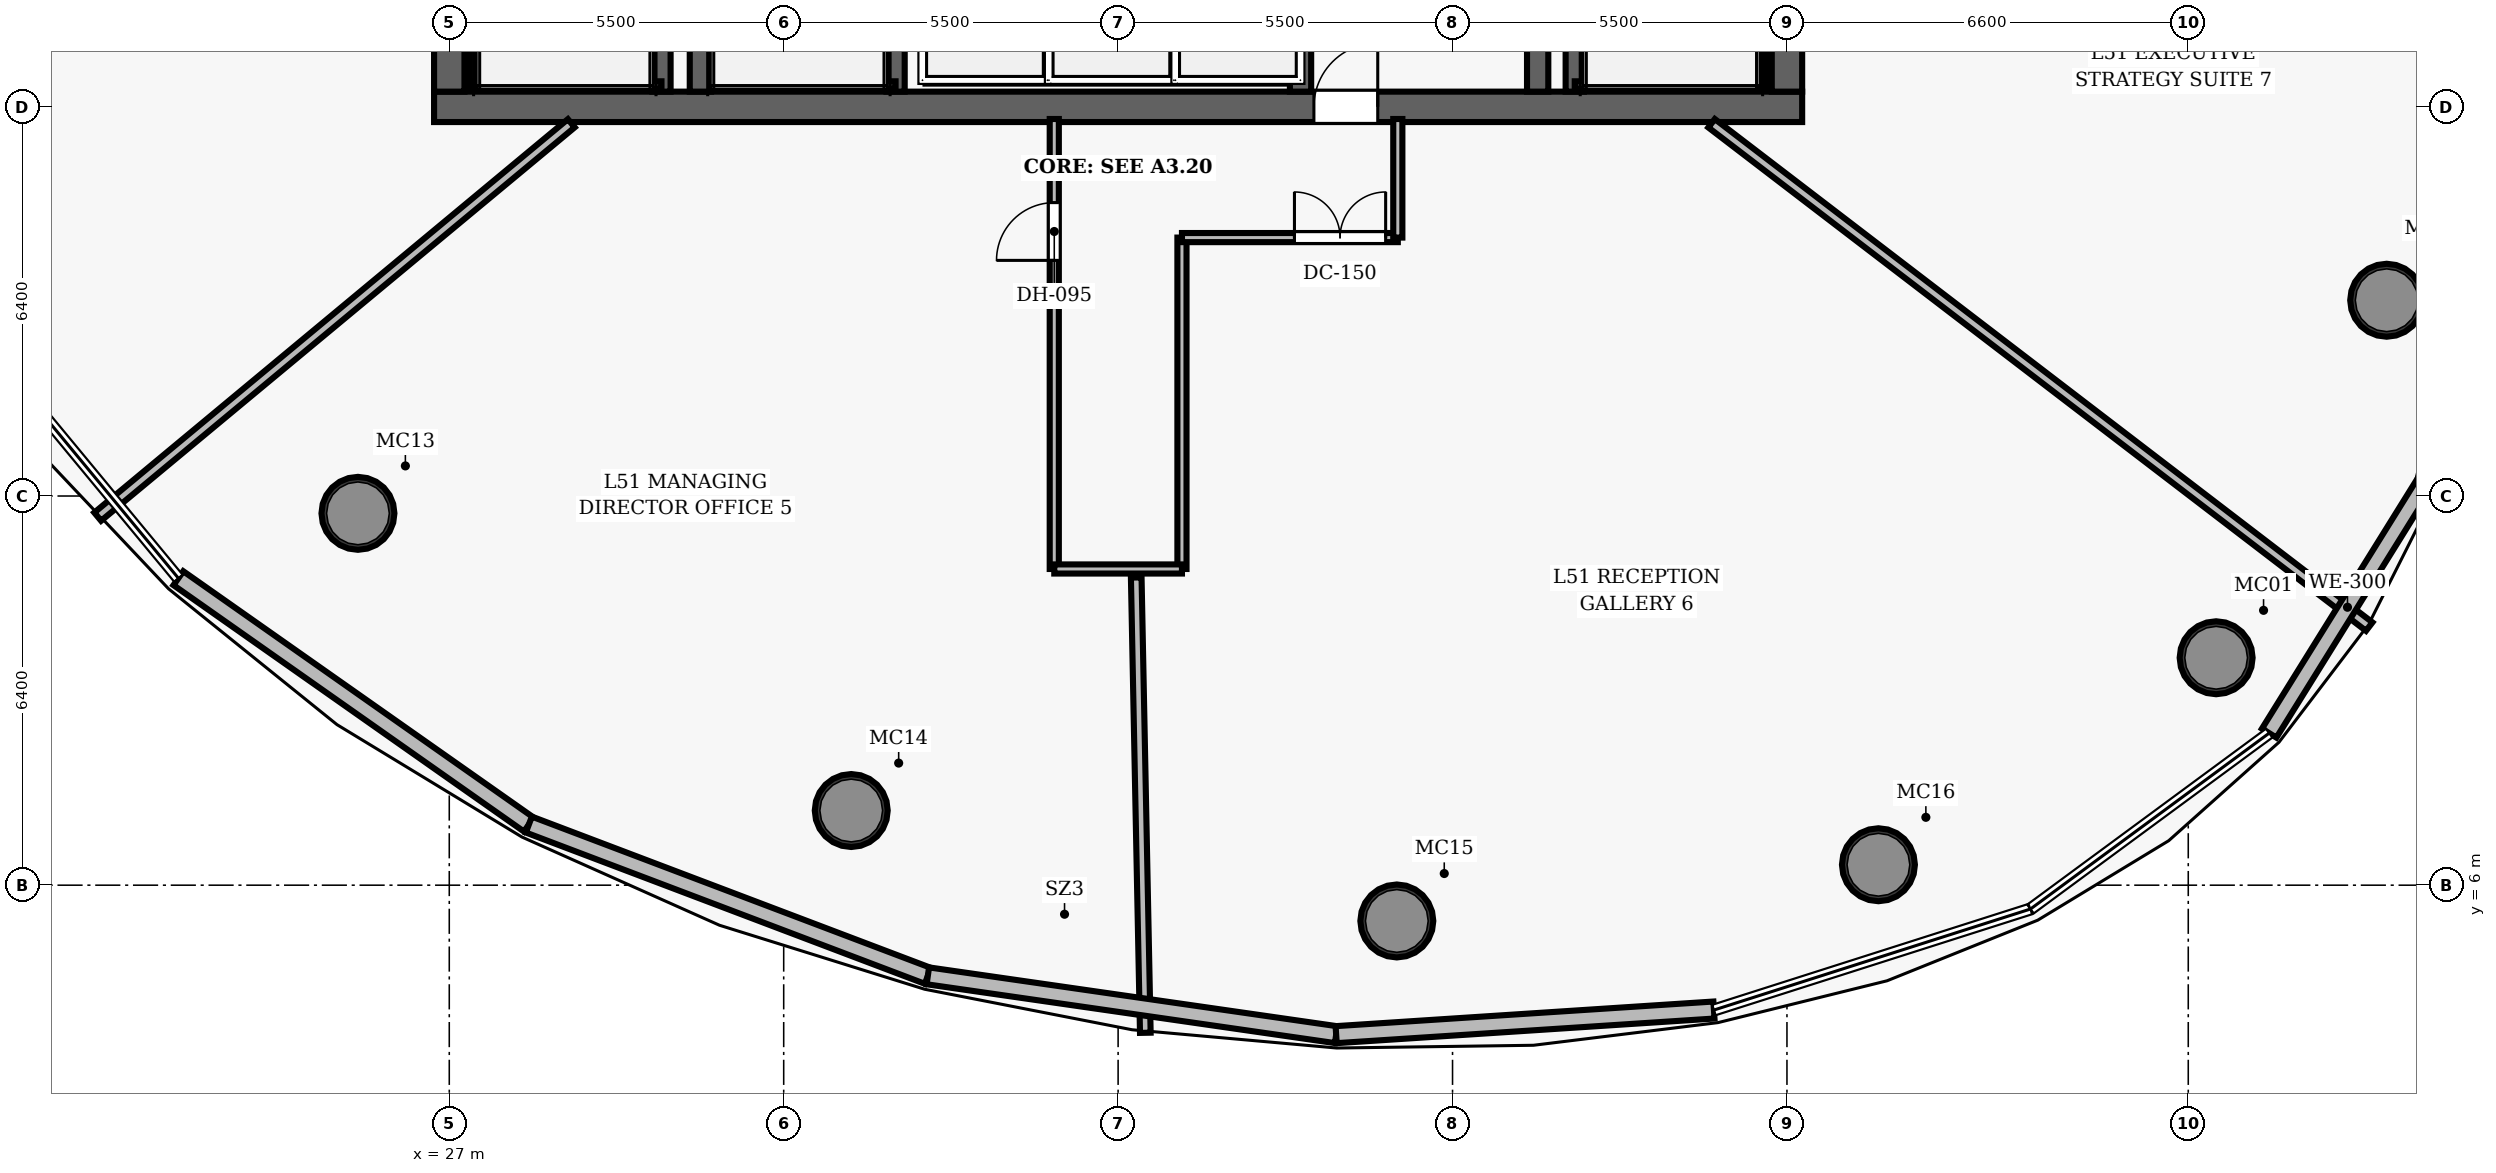
"""IFC4 building model, lengths in metres.
Left out: names, types, materials, properties, quantities, classifications, styles, units other than length and angle.
Written with IfcOpenShell. Run it as: python <this file> out.ifc"""

import sys

from ifc_helpers import new_model, si_unit, direction, frame, frame_2d, origin, origin_2d, place, context, subcontext, project, spatial, rectangle, hollow_circle, extrude, element, fill, save


model = new_model("IFC4")
c1 = context("Model", 3, precision=1e-05, world=origin(), true_north=direction((0.0, 1.0)))
c2 = subcontext(c1, "Body", "Model", "MODEL_VIEW")
j1 = project(units=[si_unit("LENGTHUNIT", "METRE"), si_unit("PLANEANGLEUNIT", "RADIAN")], contexts=[c1])
p1 = place(None, origin())
s1 = spatial("IfcSite", under=j1, at=p1, CompositionType="ELEMENT")
p2 = place(p1, origin())
s2 = spatial("IfcBuilding", under=s1, at=p2, CompositionType="ELEMENT")
p3 = place(p2, frame((0.0, 0.0, 202.0)))
s3 = spatial("IfcBuildingStorey", under=s2, at=p3, CompositionType="ELEMENT", Elevation=202.0)
p4 = place(p3, frame((26.75, 18.8, 0.0), z_axis=(0.0, 0.0, 1.0), x_axis=(1.0, 0.0, 0.0)))
e1 = element("IfcWall", 1, at=p4, inside=s3, PredefinedType="SHEAR", context=c2, shape_type="SweptSolid", body=[
    extrude(rectangle(XDim=22.5, YDim=0.5, at=frame_2d((11.25, 0.0))), origin(), (0.0, 0.0, 1.0), 3.85),
])
p5 = place(p4, frame((14.47, 0.0, 0.0)))
e2 = element("IfcOpeningElement", 2, at=p5, cuts=e1, PredefinedType="OPENING", context=c2, shape_type="SweptSolid", body=[
    extrude(rectangle(XDim=1.05, YDim=2.15, at=frame_2d((0.525, 1.075))), frame((0.0, 0.26, 0.0), z_axis=(0.0, -1.0, 0.0), x_axis=(1.0, 0.0, 0.0)), (0.0, 0.0, 1.0), 0.52),
])
p6 = place(p3, frame((27.0, 19.05, 0.0), z_axis=(0.0, 0.0, 1.0), x_axis=(0.0, 1.0, 0.0)))
e3 = element("IfcWall", 3, at=p6, inside=s3, PredefinedType="SHEAR", context=c2, shape_type="SweptSolid", body=[
    extrude(rectangle(XDim=13.9, YDim=0.5, at=frame_2d((6.95, 0.0))), origin(), (0.0, 0.0, 1.0), 3.85),
])
p7 = place(p6, frame((8.2, 0.0, 0.0)))
e4 = element("IfcOpeningElement", 4, at=p7, cuts=e3, PredefinedType="OPENING", context=c2, shape_type="SweptSolid", body=[
    extrude(rectangle(XDim=1.05, YDim=2.15, at=frame_2d((0.525, 1.075))), frame((0.0, 0.26, 0.0), z_axis=(0.0, -1.0, 0.0), x_axis=(1.0, 0.0, 0.0)), (0.0, 0.0, 1.0), 0.52),
])
p8 = place(p3, frame((49.0, 19.05, 0.0), z_axis=(0.0, 0.0, 1.0), x_axis=(0.0, 1.0, 0.0)))
e5 = element("IfcWall", 5, at=p8, inside=s3, PredefinedType="SHEAR", context=c2, shape_type="SweptSolid", body=[
    extrude(rectangle(XDim=13.9, YDim=0.5, at=frame_2d((6.95, 0.0))), origin(), (0.0, 0.0, 1.0), 3.85),
])
p9 = place(p8, frame((8.2, 0.0, 0.0)))
e6 = element("IfcOpeningElement", 6, at=p9, cuts=e5, PredefinedType="OPENING", context=c2, shape_type="SweptSolid", body=[
    extrude(rectangle(XDim=1.05, YDim=2.15, at=frame_2d((0.525, 1.075))), frame((0.0, 0.26, 0.0), z_axis=(0.0, -1.0, 0.0), x_axis=(1.0, 0.0, 0.0)), (0.0, 0.0, 1.0), 0.52),
])
for number, where, z_axis, x_axis in (
    (7, (31.13, 19.05, 0.0), (0.0, 0.0, 1.0), (0.0, 1.0, 0.0)),
    (8, (44.9, 19.05, 0.0), (0.0, 0.0, 1.0), (0.0, 1.0, 0.0)),
):
    element("IfcWall", number, at=place(p3, frame(where, z_axis=z_axis, x_axis=x_axis)), inside=s3, PredefinedType="SHEAR", context=c2, shape_type="SweptSolid", body=[
        extrude(rectangle(XDim=13.9, YDim=0.35, at=frame_2d((6.95, 0.0))), origin(), (0.0, 0.0, 1.0), 3.85),
    ])
for number, where, z_axis, x_axis in (
    (9, (56.058, 9.74, 0.0), (0.0, 0.0, 1.0), (1.0, 0.0, 0.0)),
    (10, (58.863, 15.619, 0.0), (0.0, 0.0, 1.0), (1.0, 0.0, 0.0)),
    (11, (25.498, 12.115, 0.0), (0.0, 0.0, 1.0), (1.0, 0.0, 0.0)),
    (12, (33.611, 7.228, 0.0), (0.0, 0.0, 1.0), (1.0, 0.0, 0.0)),
    (13, (42.584, 5.412, 0.0), (0.0, 0.0, 1.0), (1.0, 0.0, 0.0)),
    (14, (50.504, 6.336, 0.0), (0.0, 0.0, 1.0), (1.0, 0.0, 0.0)),
):
    element("IfcColumn", number, at=place(p3, frame(where, z_axis=z_axis, x_axis=x_axis)), inside=s3, PredefinedType="COLUMN", context=c2, shape_type="SweptSolid", body=[
        extrude(hollow_circle(Radius=0.6, WallThickness=0.05, at=origin_2d()), origin(), (0.0, 0.0, 1.0), 3.85),
    ])
p10 = place(p3, frame((30.49, 19.05, 0.0), z_axis=(0.0, 0.0, 1.0), x_axis=(0.0, 1.0, 0.0)))
e15 = element("IfcWall", 15, at=p10, inside=s3, PredefinedType="SHEAR", context=c2, shape_type="SweptSolid", body=[
    extrude(rectangle(XDim=7.5, YDim=0.3, at=frame_2d((3.75, 0.0))), origin(), (0.0, 0.0, 1.0), 3.85),
])
p11 = place(p3, frame((27.395, 19.1, 0.0), z_axis=(0.0, 0.0, 1.0), x_axis=(0.0, 1.0, 0.0)))
e16 = element("IfcWall", 16, at=p11, inside=s3, PredefinedType="SHEAR", context=c2, shape_type="SweptSolid", body=[
    extrude(rectangle(XDim=7.45, YDim=0.12, at=frame_2d((3.725, 0.0))), origin(), (0.0, 0.0, 1.0), 3.85),
])
p12 = place(p3, frame((27.395, 19.16, 0.0), z_axis=(0.0, 0.0, 1.0), x_axis=(1.0, 0.0, 0.0)))
e17 = element("IfcWall", 17, at=p12, inside=s3, PredefinedType="SHEAR", context=c2, shape_type="SweptSolid", body=[
    extrude(rectangle(XDim=3.095, YDim=0.12, at=frame_2d((1.547, 0.0))), origin(), (0.0, 0.0, 1.0), 3.85),
])
p13 = place(p3, frame((45.51, 19.05, 0.0), z_axis=(0.0, 0.0, 1.0), x_axis=(0.0, 1.0, 0.0)))
e18 = element("IfcWall", 18, at=p13, inside=s3, PredefinedType="SHEAR", context=c2, shape_type="SweptSolid", body=[
    extrude(rectangle(XDim=7.5, YDim=0.3, at=frame_2d((3.75, 0.0))), origin(), (0.0, 0.0, 1.0), 3.85),
])
p14 = place(p3, frame((48.605, 19.1, 0.0), z_axis=(0.0, 0.0, 1.0), x_axis=(0.0, 1.0, 0.0)))
e19 = element("IfcWall", 19, at=p14, inside=s3, PredefinedType="SHEAR", context=c2, shape_type="SweptSolid", body=[
    extrude(rectangle(XDim=7.45, YDim=0.12, at=frame_2d((3.725, 0.0))), origin(), (0.0, 0.0, 1.0), 3.85),
])
p15 = place(p3, frame((45.51, 19.16, 0.0), z_axis=(0.0, 0.0, 1.0), x_axis=(1.0, 0.0, 0.0)))
e20 = element("IfcWall", 20, at=p15, inside=s3, PredefinedType="SHEAR", context=c2, shape_type="SweptSolid", body=[
    extrude(rectangle(XDim=3.095, YDim=0.12, at=frame_2d((1.547, 0.0))), origin(), (0.0, 0.0, 1.0), 3.85),
])
p16 = place(p3, frame((34.34, 19.05, 0.0), z_axis=(0.0, 0.0, 1.0), x_axis=(0.0, 1.0, 0.0)))
e21 = element("IfcWall", 21, at=p16, inside=s3, PredefinedType="SHEAR", context=c2, shape_type="SweptSolid", body=[
    extrude(rectangle(XDim=7.5, YDim=0.3, at=frame_2d((3.75, 0.0))), origin(), (0.0, 0.0, 1.0), 3.85),
])
p17 = place(p3, frame((31.3, 19.16, 0.0), z_axis=(0.0, 0.0, 1.0), x_axis=(1.0, 0.0, 0.0)))
e22 = element("IfcWall", 22, at=p17, inside=s3, PredefinedType="SHEAR", context=c2, shape_type="SweptSolid", body=[
    extrude(rectangle(XDim=3.04, YDim=0.12, at=frame_2d((1.52, 0.0))), origin(), (0.0, 0.0, 1.0), 3.85),
])
p18 = place(p3, frame((41.0, 19.05, 0.0), z_axis=(0.0, 0.0, 1.0), x_axis=(0.0, 1.0, 0.0)))
e23 = element("IfcWall", 23, at=p18, inside=s3, PredefinedType="SHEAR", context=c2, shape_type="SweptSolid", body=[
    extrude(rectangle(XDim=2.08, YDim=0.35, at=frame_2d((1.04, 0.0))), origin(), (0.0, 0.0, 1.0), 3.035),
])
p19 = place(p3, frame((36.95, 11.2, 0.0), z_axis=(0.0, 0.0, 1.0), x_axis=(0.0, 1.0, 0.0)))
e24 = element("IfcWall", 24, at=p19, inside=s3, PredefinedType="PARTITIONING", context=c2, shape_type="SweptSolid", body=[
    extrude(rectangle(XDim=7.4, YDim=0.15, at=frame_2d((3.7, 0.0))), origin(), (0.0, 0.0, 1.0), 3.035),
])
p20 = place(p19, frame((5.075, 0.0, 0.0)))
e25 = element("IfcOpeningElement", 25, at=p20, cuts=e24, PredefinedType="OPENING", context=c2, shape_type="SweptSolid", body=[
    extrude(rectangle(XDim=0.95, YDim=2.15, at=frame_2d((0.475, 1.075))), frame((0.0, 0.085, 0.0), z_axis=(0.0, -1.0, 0.0), x_axis=(1.0, 0.0, 0.0)), (0.0, 0.0, 1.0), 0.17),
])
p21 = place(p3, frame((39.05, 11.2, 0.0), z_axis=(0.0, 0.0, 1.0), x_axis=(0.0, 1.0, 0.0)))
e26 = element("IfcWall", 26, at=p21, inside=s3, PredefinedType="PARTITIONING", context=c2, shape_type="SweptSolid", body=[
    extrude(rectangle(XDim=5.45, YDim=0.15, at=frame_2d((2.725, 0.0))), origin(), (0.0, 0.0, 1.0), 3.035),
])
p22 = place(p3, frame((39.05, 16.65, 0.0), z_axis=(0.0, 0.0, 1.0), x_axis=(1.0, 0.0, 0.0)))
e27 = element("IfcWall", 27, at=p22, inside=s3, PredefinedType="PARTITIONING", context=c2, shape_type="SweptSolid", body=[
    extrude(rectangle(XDim=3.55, YDim=0.15, at=frame_2d((1.775, 0.0))), origin(), (0.0, 0.0, 1.0), 3.035),
])
p23 = place(p22, frame((1.85, 0.0, 0.0)))
e28 = element("IfcOpeningElement", 28, at=p23, cuts=e27, PredefinedType="OPENING", context=c2, shape_type="SweptSolid", body=[
    extrude(rectangle(XDim=1.5, YDim=2.2, at=frame_2d((0.75, 1.1))), frame((0.0, 0.085, 0.0), z_axis=(0.0, -1.0, 0.0), x_axis=(1.0, 0.0, 0.0)), (0.0, 0.0, 1.0), 0.17),
])
p24 = place(p3, frame((42.6, 16.65, 0.0), z_axis=(0.0, 0.0, 1.0), x_axis=(0.0, 1.0, 0.0)))
e29 = element("IfcWall", 29, at=p24, inside=s3, PredefinedType="PARTITIONING", context=c2, shape_type="SweptSolid", body=[
    extrude(rectangle(XDim=1.95, YDim=0.15, at=frame_2d((0.975, 0.0))), origin(), (0.0, 0.0, 1.0), 3.035),
])
p25 = place(p3, frame((36.95, 11.2, 0.0), z_axis=(0.0, 0.0, 1.0), x_axis=(1.0, 0.0, 0.0)))
e30 = element("IfcWall", 30, at=p25, inside=s3, PredefinedType="PARTITIONING", context=c2, shape_type="SweptSolid", body=[
    extrude(rectangle(XDim=2.1, YDim=0.15, at=frame_2d((1.05, 0.0))), origin(), (0.0, 0.0, 1.0), 3.035),
])
p26 = place(p3, frame((29.007, 18.53, 0.0), z_axis=(0.0, 0.0, 1.0), x_axis=(-0.76922629078, -0.638976457761, 0.0)))
e31 = element("IfcWall", 31, at=p26, inside=s3, PredefinedType="PARTITIONING", context=c2, shape_type="SweptSolid", body=[
    extrude(rectangle(XDim=10.125, YDim=0.175, at=frame_2d((5.063, 0.0))), origin(), (0.0, 0.0, 1.0), 3.035),
])
p27 = place(p3, frame((38.298, 11.06, 0.0), z_axis=(0.0, 0.0, 1.0), x_axis=(0.019951031547, -0.999800958361, 0.0)))
e32 = element("IfcWall", 32, at=p27, inside=s3, PredefinedType="PARTITIONING", context=c2, shape_type="SweptSolid", body=[
    extrude(rectangle(XDim=7.489, YDim=0.175, at=frame_2d((3.745, 0.0))), origin(), (0.0, 0.0, 1.0), 3.035),
])
p28 = place(p3, frame((47.76, 18.53, 0.0), z_axis=(0.0, 0.0, 1.0), x_axis=(0.794115585975, -0.607766761276, 0.0)))
e33 = element("IfcWall", 33, at=p28, inside=s3, PredefinedType="PARTITIONING", context=c2, shape_type="SweptSolid", body=[
    extrude(rectangle(XDim=13.62, YDim=0.175, at=frame_2d((6.81, 0.0))), origin(), (0.0, 0.0, 1.0), 3.035),
])
p29 = place(p3, frame((59.506, 12.641, 0.0), z_axis=(0.0, 0.0, 1.0), x_axis=(-0.528161516042, -0.849143929479, 0.0)))
e34 = element("IfcWall", 34, at=p29, inside=s3, PredefinedType="SOLIDWALL", context=c2, shape_type="SweptSolid", body=[
    extrude(rectangle(XDim=4.876, YDim=0.28, at=frame_2d((2.438, 0.0))), origin(), (0.0, 0.0, 1.0), 3.62),
])
p30 = place(p3, frame((28.309, 6.997, 0.0), z_axis=(0.0, 0.0, 1.0), x_axis=(-0.818095643042, 0.575082184418, 0.0)))
e35 = element("IfcWall", 35, at=p30, inside=s3, PredefinedType="SOLIDWALL", context=c2, shape_type="SweptSolid", body=[
    extrude(rectangle(XDim=7.045, YDim=0.28, at=frame_2d((3.523, 0.0))), origin(), (0.0, 0.0, 1.0), 3.62),
])
p31 = place(p3, frame((34.871, 4.509, 0.0), z_axis=(0.0, 0.0, 1.0), x_axis=(-0.935079448988, 0.354438180902, 0.0)))
e36 = element("IfcWall", 36, at=p31, inside=s3, PredefinedType="SOLIDWALL", context=c2, shape_type="SweptSolid", body=[
    extrude(rectangle(XDim=7.018, YDim=0.28, at=frame_2d((3.509, 0.0))), origin(), (0.0, 0.0, 1.0), 3.62),
])
p32 = place(p3, frame((41.586, 3.542, 0.0), z_axis=(0.0, 0.0, 1.0), x_axis=(-0.989784738796, 0.142569880575, 0.0)))
e37 = element("IfcWall", 37, at=p32, inside=s3, PredefinedType="SOLIDWALL", context=c2, shape_type="SweptSolid", body=[
    extrude(rectangle(XDim=6.785, YDim=0.28, at=frame_2d((3.392, 0.0))), origin(), (0.0, 0.0, 1.0), 3.62),
])
p33 = place(p3, frame((47.799, 3.947, 0.0), z_axis=(0.0, 0.0, 1.0), x_axis=(-0.997881932346, -0.065051126793, 0.0)))
e38 = element("IfcWall", 38, at=p33, inside=s3, PredefinedType="SOLIDWALL", context=c2, shape_type="SweptSolid", body=[
    extrude(rectangle(XDim=6.226, YDim=0.28, at=frame_2d((3.113, 0.0))), origin(), (0.0, 0.0, 1.0), 3.62),
])
p34 = place(p5, origin())
e39 = element("IfcDoor", 39, at=p34, inside=s3, OperationType="SINGLE_SWING_RIGHT", PredefinedType="DOOR", context=c2, shape_type="SweptSolid", body=[
    extrude(rectangle(XDim=1.05, YDim=2.15, at=frame_2d((0.525, 1.075))), frame((0.0, 0.025, 0.0), z_axis=(0.0, -1.0, 0.0), x_axis=(1.0, 0.0, 0.0)), (0.0, 0.0, 1.0), 0.05),
])
fill(e2, e39)
p35 = place(p20, origin())
e40 = element("IfcDoor", 40, at=p35, inside=s3, OperationType="SINGLE_SWING_LEFT", PredefinedType="DOOR", context=c2, shape_type="SweptSolid", body=[
    extrude(rectangle(XDim=0.95, YDim=2.15, at=frame_2d((0.475, 1.075))), frame((0.0, 0.025, 0.0), z_axis=(0.0, -1.0, 0.0), x_axis=(1.0, 0.0, 0.0)), (0.0, 0.0, 1.0), 0.05),
])
fill(e25, e40)
p36 = place(p23, origin())
e41 = element("IfcDoor", 41, at=p36, inside=s3, OperationType="DOUBLE_DOOR_SINGLE_SWING", PredefinedType="DOOR", context=c2, shape_type="SweptSolid", body=[
    extrude(rectangle(XDim=1.5, YDim=2.2, at=frame_2d((0.75, 1.1))), frame((0.0, 0.025, 0.0), z_axis=(0.0, -1.0, 0.0), x_axis=(1.0, 0.0, 0.0)), (0.0, 0.0, 1.0), 0.05),
])
fill(e28, e41)
save(model, sys.argv[1])
